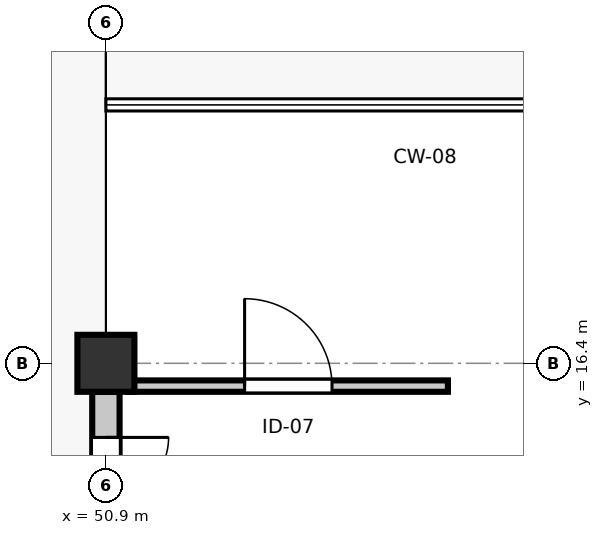
"""IFC4 building model, lengths in metres.
Left out: names, types, materials, properties, quantities, classifications, styles, units other than length and angle.
Written with IfcOpenShell. Run it as: python <this file> out.ifc"""

import sys

from ifc_helpers import new_model, si_unit, direction, frame, frame_2d, origin, origin_2d, place, context, subcontext, project, spatial, rectangle, extrude, element, fill, save


model = new_model("IFC4")
c1 = context("Model", 3, precision=1e-05, world=origin(), true_north=direction((0.0, 1.0)))
c2 = subcontext(c1, "Body", "Model", "MODEL_VIEW")
j1 = project(units=[si_unit("LENGTHUNIT", "METRE"), si_unit("PLANEANGLEUNIT", "RADIAN")], contexts=[c1])
p1 = place(None, origin())
s1 = spatial("IfcSite", under=j1, at=p1, CompositionType="ELEMENT")
p2 = place(p1, origin())
s2 = spatial("IfcBuilding", under=s1, at=p2, CompositionType="ELEMENT")
p3 = place(p2, frame((0.0, 0.0, 9.6)))
s3 = spatial("IfcBuildingStorey", under=s2, at=p3, CompositionType="ELEMENT", Elevation=9.6)
p4 = place(p3, frame((50.9, 16.4, 0.0), z_axis=(0.0, 0.0, 1.0), x_axis=(1.0, 0.0, 0.0)))
e1 = element("IfcColumn", 1, at=p4, inside=s3, PredefinedType="COLUMN", context=c2, shape_type="SweptSolid", body=[
    extrude(rectangle(XDim=0.75, YDim=0.75, at=origin_2d()), origin(), (0.0, 0.0, 1.0), 4.8),
])
p5 = place(p3, frame((50.9, 16.025, 0.0), z_axis=(0.0, 0.0, 1.0), x_axis=(0.0, -1.0, 0.0)))
e2 = element("IfcWall", 2, at=p5, inside=s3, PredefinedType="STANDARD", context=c2, shape_type="SweptSolid", body=[
    extrude(rectangle(XDim=7.65, YDim=0.36, at=frame_2d((3.825, 0.0))), origin(), (0.0, 0.0, 1.0), 3.745),
])
p6 = place(p5, frame((0.6, 0.0, 0.0)))
e3 = element("IfcOpeningElement", 3, at=p6, cuts=e2, PredefinedType="OPENING", context=c2, shape_type="SweptSolid", body=[
    extrude(rectangle(XDim=1.65, YDim=2.25, at=frame_2d((0.825, 1.125))), frame((0.0, 0.19, 0.0), z_axis=(0.0, -1.0, 0.0), x_axis=(1.0, 0.0, 0.0)), (0.0, 0.0, 1.0), 0.38),
])
p7 = place(p3, frame((51.2, 16.1, 0.0), z_axis=(0.0, 0.0, 1.0), x_axis=(1.0, 0.0, 0.0)))
e4 = element("IfcWall", 4, at=p7, inside=s3, PredefinedType="PARTITIONING", context=c2, shape_type="SweptSolid", body=[
    extrude(rectangle(XDim=4.2, YDim=0.15, at=frame_2d((2.1, 0.0))), origin(), (0.0, 0.0, 1.0), 3.645),
])
p8 = place(p7, frame((1.525, 0.0, 0.0)))
e5 = element("IfcOpeningElement", 5, at=p8, cuts=e4, PredefinedType="OPENING", context=c2, shape_type="SweptSolid", body=[
    extrude(rectangle(XDim=1.15, YDim=2.15, at=frame_2d((0.575, 1.075))), frame((0.0, 0.085, 0.0), z_axis=(0.0, -1.0, 0.0), x_axis=(1.0, 0.0, 0.0)), (0.0, 0.0, 1.0), 0.17),
])
p9 = place(p6, origin())
e6 = element("IfcDoor", 6, at=p9, inside=s3, OperationType="DOUBLE_DOOR_SINGLE_SWING", PredefinedType="DOOR", context=c2, shape_type="SweptSolid", body=[
    extrude(rectangle(XDim=1.65, YDim=2.25, at=frame_2d((0.825, 1.125))), frame((0.0, 0.025, 0.0), z_axis=(0.0, -1.0, 0.0), x_axis=(1.0, 0.0, 0.0)), (0.0, 0.0, 1.0), 0.05),
])
fill(e3, e6)
p10 = place(p8, origin())
e7 = element("IfcDoor", 7, at=p10, inside=s3, OperationType="SINGLE_SWING_LEFT", PredefinedType="DOOR", context=c2, shape_type="SweptSolid", body=[
    extrude(rectangle(XDim=1.15, YDim=2.15, at=frame_2d((0.575, 1.075))), frame((0.0, 0.025, 0.0), z_axis=(0.0, -1.0, 0.0), x_axis=(1.0, 0.0, 0.0)), (0.0, 0.0, 1.0), 0.05),
])
fill(e5, e7)
save(model, sys.argv[1])
